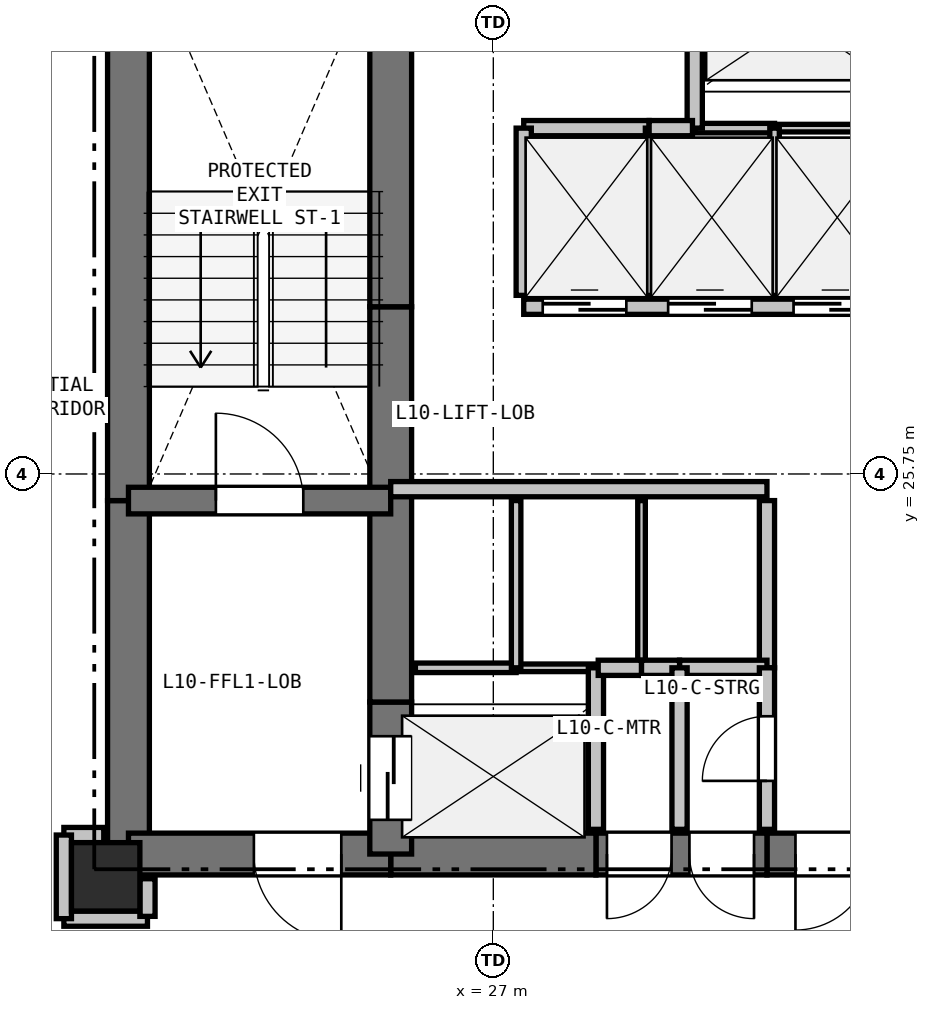
"""IFC4 building model, lengths in metres.
Left out: names, types, materials, properties, quantities, classifications, styles, units other than length and angle.
Written with IfcOpenShell. Run it as: python <this file> out.ifc"""

import sys

from ifc_helpers import new_model, si_unit, direction, frame, frame_2d, origin, origin_2d, place, context, subcontext, project, spatial, rectangle, extrude, element, fill, save


model = new_model("IFC4")
c1 = context("Model", 3, precision=1e-05, world=origin(), true_north=direction((0.0, 1.0)))
c2 = subcontext(c1, "Body", "Model", "MODEL_VIEW")
j1 = project(units=[si_unit("LENGTHUNIT", "METRE"), si_unit("PLANEANGLEUNIT", "RADIAN")], contexts=[c1])
p1 = place(None, origin())
s1 = spatial("IfcSite", under=j1, at=p1, CompositionType="ELEMENT")
p2 = place(p1, origin())
s2 = spatial("IfcBuilding", under=s1, at=p2, CompositionType="ELEMENT")
p3 = place(p2, frame((0.0, 0.0, 39.0)))
s3 = spatial("IfcBuildingStorey", under=s2, at=p3, CompositionType="ELEMENT", Elevation=39.0)
p4 = place(p3, frame((21.9, 20.45, 0.0), z_axis=(0.0, 0.0, 1.0), x_axis=(1.0, 0.0, 0.0)))
e1 = element("IfcColumn", 1, at=p4, inside=s3, PredefinedType="COLUMN", context=c2, shape_type="SweptSolid", body=[
    extrude(rectangle(XDim=0.9, YDim=0.9, at=origin_2d()), origin(), (0.0, 0.0, 1.0), 3.3),
])
p5 = place(p3, frame((22.2, 20.75, 0.0), z_axis=(0.0, 0.0, 1.0), x_axis=(0.0, 1.0, 0.0)))
e2 = element("IfcWall", 2, at=p5, inside=s3, PredefinedType="SHEAR", context=c2, shape_type="SweptSolid", body=[
    extrude(rectangle(XDim=4.65, YDim=0.55, at=frame_2d((2.325, 0.0))), origin(), (0.0, 0.0, 1.0), 3.04),
])
p6 = place(p3, frame((22.2, 25.4, 0.0), z_axis=(0.0, 0.0, 1.0), x_axis=(0.0, 1.0, 0.0)))
e3 = element("IfcWall", 3, at=p6, inside=s3, PredefinedType="SHEAR", context=c2, shape_type="SweptSolid", body=[
    extrude(rectangle(XDim=7.35, YDim=0.55, at=frame_2d((3.675, 0.0))), origin(), (0.0, 0.0, 1.0), 3.04),
])
p7 = place(p3, frame((32.35, 20.75, 0.0), z_axis=(0.0, 0.0, 1.0), x_axis=(-1.0, 0.0, 0.0)))
e4 = element("IfcWall", 4, at=p7, inside=s3, PredefinedType="SHEAR", context=c2, shape_type="SweptSolid", body=[
    extrude(rectangle(XDim=1.75, YDim=0.55, at=frame_2d((0.875, 0.0))), origin(), (0.0, 0.0, 1.0), 3.04),
])
p8 = place(p7, frame((0.375, 0.0, 0.0)))
e5 = element("IfcOpeningElement", 5, at=p8, cuts=e4, PredefinedType="OPENING", context=c2, shape_type="SweptSolid", body=[
    extrude(rectangle(XDim=1.0, YDim=2.15, at=frame_2d((0.5, 1.075))), frame((0.0, 0.285, 0.0), z_axis=(0.0, -1.0, 0.0), x_axis=(1.0, 0.0, 0.0)), (0.0, 0.0, 1.0), 0.57),
])
p9 = place(p3, frame((30.6, 20.75, 0.0), z_axis=(0.0, 0.0, 1.0), x_axis=(-1.0, 0.0, 0.0)))
e6 = element("IfcWall", 6, at=p9, inside=s3, PredefinedType="SHEAR", context=c2, shape_type="SweptSolid", body=[
    extrude(rectangle(XDim=2.25, YDim=0.55, at=frame_2d((1.125, 0.0))), origin(), (0.0, 0.0, 1.0), 3.04),
])
p10 = place(p9, frame((1.255, 0.0, 0.0)))
e7 = element("IfcOpeningElement", 7, at=p10, cuts=e6, PredefinedType="OPENING", context=c2, shape_type="SweptSolid", body=[
    extrude(rectangle(XDim=0.85, YDim=2.1, at=frame_2d((0.425, 1.05))), frame((0.0, 0.285, 0.0), z_axis=(0.0, -1.0, 0.0), x_axis=(1.0, 0.0, 0.0)), (0.0, 0.0, 1.0), 0.57),
])
p11 = place(p9, frame((0.17, 0.0, 0.0)))
e8 = element("IfcOpeningElement", 8, at=p11, cuts=e6, PredefinedType="OPENING", context=c2, shape_type="SweptSolid", body=[
    extrude(rectangle(XDim=0.85, YDim=2.1, at=frame_2d((0.425, 1.05))), frame((0.0, 0.285, 0.0), z_axis=(0.0, -1.0, 0.0), x_axis=(1.0, 0.0, 0.0)), (0.0, 0.0, 1.0), 0.57),
])
p12 = place(p3, frame((28.35, 20.75, 0.0), z_axis=(0.0, 0.0, 1.0), x_axis=(-1.0, 0.0, 0.0)))
e9 = element("IfcWall", 9, at=p12, inside=s3, PredefinedType="SHEAR", context=c2, shape_type="SweptSolid", body=[
    extrude(rectangle(XDim=2.7, YDim=0.55, at=frame_2d((1.35, 0.0))), origin(), (0.0, 0.0, 1.0), 3.04),
])
p13 = place(p3, frame((25.65, 20.75, 0.0), z_axis=(0.0, 0.0, 1.0), x_axis=(-1.0, 0.0, 0.0)))
e10 = element("IfcWall", 10, at=p13, inside=s3, PredefinedType="SHEAR", context=c2, shape_type="SweptSolid", body=[
    extrude(rectangle(XDim=3.45, YDim=0.55, at=frame_2d((1.725, 0.0))), origin(), (0.0, 0.0, 1.0), 3.04),
])
p14 = place(p13, frame((0.65, 0.0, 0.0)))
e11 = element("IfcOpeningElement", 11, at=p14, cuts=e10, PredefinedType="OPENING", context=c2, shape_type="SweptSolid", body=[
    extrude(rectangle(XDim=1.15, YDim=2.15, at=frame_2d((0.575, 1.075))), frame((0.0, 0.285, 0.0), z_axis=(0.0, -1.0, 0.0), x_axis=(1.0, 0.0, 0.0)), (0.0, 0.0, 1.0), 0.57),
])
p15 = place(p3, frame((25.65, 20.75, 0.0), z_axis=(0.0, 0.0, 1.0), x_axis=(0.0, 1.0, 0.0)))
e12 = element("IfcWall", 12, at=p15, inside=s3, PredefinedType="SHEAR", context=c2, shape_type="SweptSolid", body=[
    extrude(rectangle(XDim=2.0, YDim=0.55, at=frame_2d((1.0, 0.0))), origin(), (0.0, 0.0, 1.0), 3.04),
])
p16 = place(p15, frame((0.45, 0.0, 0.0)))
e13 = element("IfcOpeningElement", 13, at=p16, cuts=e12, PredefinedType="OPENING", context=c2, shape_type="SweptSolid", body=[
    extrude(rectangle(XDim=1.1, YDim=2.15, at=frame_2d((0.55, 1.075))), frame((0.0, 0.285, 0.0), z_axis=(0.0, -1.0, 0.0), x_axis=(1.0, 0.0, 0.0)), (0.0, 0.0, 1.0), 0.57),
])
p17 = place(p3, frame((25.65, 22.75, 0.0), z_axis=(0.0, 0.0, 1.0), x_axis=(0.0, 1.0, 0.0)))
e14 = element("IfcWall", 14, at=p17, inside=s3, PredefinedType="SHEAR", context=c2, shape_type="SweptSolid", body=[
    extrude(rectangle(XDim=2.8, YDim=0.55, at=frame_2d((1.4, 0.0))), origin(), (0.0, 0.0, 1.0), 3.04),
])
p18 = place(p3, frame((25.65, 25.55, 0.0), z_axis=(0.0, 0.0, 1.0), x_axis=(0.0, 1.0, 0.0)))
e15 = element("IfcWall", 15, at=p18, inside=s3, PredefinedType="SHEAR", context=c2, shape_type="SweptSolid", body=[
    extrude(rectangle(XDim=2.4, YDim=0.55, at=frame_2d((1.2, 0.0))), origin(), (0.0, 0.0, 1.0), 3.04),
])
p19 = place(p3, frame((25.65, 27.95, 0.0), z_axis=(0.0, 0.0, 1.0), x_axis=(0.0, 1.0, 0.0)))
e16 = element("IfcWall", 16, at=p19, inside=s3, PredefinedType="SHEAR", context=c2, shape_type="SweptSolid", body=[
    extrude(rectangle(XDim=4.8, YDim=0.55, at=frame_2d((2.4, 0.0))), origin(), (0.0, 0.0, 1.0), 3.04),
])
p20 = place(p3, frame((22.2, 25.4, 0.0), z_axis=(0.0, 0.0, 1.0), x_axis=(1.0, 0.0, 0.0)))
e17 = element("IfcWall", 17, at=p20, inside=s3, PredefinedType="SHEAR", context=c2, shape_type="SweptSolid", body=[
    extrude(rectangle(XDim=3.45, YDim=0.35, at=frame_2d((1.725, 0.0))), origin(), (0.0, 0.0, 1.0), 3.04),
])
p21 = place(p20, frame((1.15, 0.0, 0.0)))
e18 = element("IfcOpeningElement", 18, at=p21, cuts=e17, PredefinedType="OPENING", context=c2, shape_type="SweptSolid", body=[
    extrude(rectangle(XDim=1.15, YDim=2.15, at=frame_2d((0.575, 1.075))), frame((0.0, 0.185, 0.0), z_axis=(0.0, -1.0, 0.0), x_axis=(1.0, 0.0, 0.0)), (0.0, 0.0, 1.0), 0.37),
])
p22 = place(p3, frame((25.65, 25.55, 0.0), z_axis=(0.0, 0.0, 1.0), x_axis=(1.0, 0.0, 0.0)))
e19 = element("IfcWall", 19, at=p22, inside=s3, PredefinedType="PARTITIONING", context=c2, shape_type="SweptSolid", body=[
    extrude(rectangle(XDim=4.95, YDim=0.2, at=frame_2d((2.475, 0.0))), origin(), (0.0, 0.0, 1.0), 3.04),
])
p23 = place(p3, frame((27.4, 27.95, 0.0), z_axis=(0.0, 0.0, 1.0), x_axis=(1.0, 0.0, 0.0)))
e20 = element("IfcWall", 20, at=p23, inside=s3, PredefinedType="PARTITIONING", context=c2, shape_type="SweptSolid", body=[
    extrude(rectangle(XDim=4.95, YDim=0.2, at=frame_2d((2.475, 0.0))), origin(), (0.0, 0.0, 1.0), 3.04),
])
p24 = place(p23, frame((0.25, 0.0, 0.0)))
e21 = element("IfcOpeningElement", 21, at=p24, cuts=e20, PredefinedType="OPENING", context=c2, shape_type="SweptSolid", body=[
    extrude(rectangle(XDim=1.1, YDim=2.15, at=frame_2d((0.55, 1.075))), frame((0.0, 0.11, 0.0), z_axis=(0.0, -1.0, 0.0), x_axis=(1.0, 0.0, 0.0)), (0.0, 0.0, 1.0), 0.22),
])
p25 = place(p23, frame((1.9, 0.0, 0.0)))
e22 = element("IfcOpeningElement", 22, at=p25, cuts=e20, PredefinedType="OPENING", context=c2, shape_type="SweptSolid", body=[
    extrude(rectangle(XDim=1.1, YDim=2.15, at=frame_2d((0.55, 1.075))), frame((0.0, 0.11, 0.0), z_axis=(0.0, -1.0, 0.0), x_axis=(1.0, 0.0, 0.0)), (0.0, 0.0, 1.0), 0.22),
])
p26 = place(p23, frame((3.55, 0.0, 0.0)))
e23 = element("IfcOpeningElement", 23, at=p26, cuts=e20, PredefinedType="OPENING", context=c2, shape_type="SweptSolid", body=[
    extrude(rectangle(XDim=1.1, YDim=2.15, at=frame_2d((0.55, 1.075))), frame((0.0, 0.11, 0.0), z_axis=(0.0, -1.0, 0.0), x_axis=(1.0, 0.0, 0.0)), (0.0, 0.0, 1.0), 0.22),
])
p27 = place(p3, frame((25.975, 23.2, 0.0), z_axis=(0.0, 0.0, 1.0), x_axis=(1.0, 0.0, 0.0)))
e24 = element("IfcWall", 24, at=p27, inside=s3, PredefinedType="PARTITIONING", context=c2, shape_type="SweptSolid", body=[
    extrude(rectangle(XDim=1.325, YDim=0.125, at=frame_2d((0.663, 0.0))), origin(), (0.0, 0.0, 1.0), 3.04),
])
p28 = place(p3, frame((27.3, 23.2, 0.0), z_axis=(0.0, 0.0, 1.0), x_axis=(1.0, 0.0, 0.0)))
e25 = element("IfcWall", 25, at=p28, inside=s3, PredefinedType="PARTITIONING", context=c2, shape_type="SweptSolid", body=[
    extrude(rectangle(XDim=1.05, YDim=0.1, at=frame_2d((0.525, 0.0))), origin(), (0.0, 0.0, 1.0), 3.04),
])
p29 = place(p3, frame((28.35, 23.2, 0.0), z_axis=(0.0, 0.0, 1.0), x_axis=(0.0, -1.0, 0.0)))
e26 = element("IfcWall", 26, at=p29, inside=s3, PredefinedType="PARTITIONING", context=c2, shape_type="SweptSolid", body=[
    extrude(rectangle(XDim=2.125, YDim=0.2, at=frame_2d((1.062, 0.0))), origin(), (0.0, 0.0, 1.0), 3.04),
])
p30 = place(p3, frame((32.025, 30.3, 0.0), z_axis=(0.0, 0.0, 1.0), x_axis=(-1.0, 0.0, 0.0)))
e27 = element("IfcWall", 27, at=p30, inside=s3, PredefinedType="PARTITIONING", context=c2, shape_type="SweptSolid", body=[
    extrude(rectangle(XDim=1.325, YDim=0.1, at=frame_2d((0.663, 0.0))), origin(), (0.0, 0.0, 1.0), 3.04),
])
p31 = place(p3, frame((30.7, 30.3, 0.0), z_axis=(0.0, 0.0, 1.0), x_axis=(-1.0, 0.0, 0.0)))
e28 = element("IfcWall", 28, at=p31, inside=s3, PredefinedType="PARTITIONING", context=c2, shape_type="SweptSolid", body=[
    extrude(rectangle(XDim=1.05, YDim=0.125, at=frame_2d((0.525, 0.0))), origin(), (0.0, 0.0, 1.0), 3.04),
])
p32 = place(p3, frame((29.65, 30.3, 0.0), z_axis=(0.0, 0.0, 1.0), x_axis=(0.0, 1.0, 0.0)))
e29 = element("IfcWall", 29, at=p32, inside=s3, PredefinedType="PARTITIONING", context=c2, shape_type="SweptSolid", body=[
    extrude(rectangle(XDim=2.125, YDim=0.2, at=frame_2d((1.062, 0.0))), origin(), (0.0, 0.0, 1.0), 3.04),
])
p33 = place(p3, frame((27.3, 25.4, 0.0), z_axis=(0.0, 0.0, 1.0), x_axis=(0.0, -1.0, 0.0)))
e30 = element("IfcWall", 30, at=p33, inside=s3, PredefinedType="PARTITIONING", context=c2, shape_type="SweptSolid", body=[
    extrude(rectangle(XDim=2.2, YDim=0.125, at=frame_2d((1.1, 0.0))), origin(), (0.0, 0.0, 1.0), 3.04),
])
p34 = place(p3, frame((28.95, 25.4, 0.0), z_axis=(0.0, 0.0, 1.0), x_axis=(0.0, -1.0, 0.0)))
e31 = element("IfcWall", 31, at=p34, inside=s3, PredefinedType="PARTITIONING", context=c2, shape_type="SweptSolid", body=[
    extrude(rectangle(XDim=2.2, YDim=0.1, at=frame_2d((1.1, 0.0))), origin(), (0.0, 0.0, 1.0), 3.04),
])
p35 = place(p3, frame((28.95, 23.2, 0.0), z_axis=(0.0, 0.0, 1.0), x_axis=(-1.0, 0.0, 0.0)))
e32 = element("IfcWall", 32, at=p35, inside=s3, PredefinedType="PARTITIONING", context=c2, shape_type="SweptSolid", body=[
    extrude(rectangle(XDim=0.57, YDim=0.2, at=frame_2d((0.285, 0.0))), origin(), (0.0, 0.0, 1.0), 3.04),
])
p36 = place(p3, frame((30.6, 25.4, 0.0), z_axis=(0.0, 0.0, 1.0), x_axis=(0.0, -1.0, 0.0)))
e33 = element("IfcWall", 33, at=p36, inside=s3, PredefinedType="PARTITIONING", context=c2, shape_type="SweptSolid", body=[
    extrude(rectangle(XDim=2.2, YDim=0.2, at=frame_2d((1.1, 0.0))), origin(), (0.0, 0.0, 1.0), 3.04),
])
p37 = place(p3, frame((30.6, 23.2, 0.0), z_axis=(0.0, 0.0, 1.0), x_axis=(-1.0, 0.0, 0.0)))
e34 = element("IfcWall", 34, at=p37, inside=s3, PredefinedType="PARTITIONING", context=c2, shape_type="SweptSolid", body=[
    extrude(rectangle(XDim=1.15, YDim=0.2, at=frame_2d((0.575, 0.0))), origin(), (0.0, 0.0, 1.0), 3.04),
])
p38 = place(p3, frame((29.45, 23.2, 0.0), z_axis=(0.0, 0.0, 1.0), x_axis=(-1.0, 0.0, 0.0)))
e35 = element("IfcWall", 35, at=p38, inside=s3, PredefinedType="PARTITIONING", context=c2, shape_type="SweptSolid", body=[
    extrude(rectangle(XDim=0.5, YDim=0.2, at=frame_2d((0.25, 0.0))), origin(), (0.0, 0.0, 1.0), 3.04),
])
p39 = place(p3, frame((27.4, 30.3, 0.0), z_axis=(0.0, 0.0, 1.0), x_axis=(1.0, 0.0, 0.0)))
e36 = element("IfcWall", 36, at=p39, inside=s3, PredefinedType="PARTITIONING", context=c2, shape_type="SweptSolid", body=[
    extrude(rectangle(XDim=1.65, YDim=0.2, at=frame_2d((0.825, 0.0))), origin(), (0.0, 0.0, 1.0), 3.04),
])
p40 = place(p3, frame((29.05, 30.3, 0.0), z_axis=(0.0, 0.0, 1.0), x_axis=(0.0, -1.0, 0.0)))
e37 = element("IfcWall", 37, at=p40, inside=s3, PredefinedType="PARTITIONING", context=c2, shape_type="SweptSolid", body=[
    extrude(rectangle(XDim=2.2, YDim=0.1, at=frame_2d((1.1, 0.0))), origin(), (0.0, 0.0, 1.0), 3.04),
])
p41 = place(p3, frame((27.4, 28.1, 0.0), z_axis=(0.0, 0.0, 1.0), x_axis=(0.0, 1.0, 0.0)))
e38 = element("IfcWall", 38, at=p41, inside=s3, PredefinedType="PARTITIONING", context=c2, shape_type="SweptSolid", body=[
    extrude(rectangle(XDim=2.2, YDim=0.2, at=frame_2d((1.1, 0.0))), origin(), (0.0, 0.0, 1.0), 3.04),
])
p42 = place(p3, frame((29.05, 30.3, 0.0), z_axis=(0.0, 0.0, 1.0), x_axis=(1.0, 0.0, 0.0)))
e39 = element("IfcWall", 39, at=p42, inside=s3, PredefinedType="PARTITIONING", context=c2, shape_type="SweptSolid", body=[
    extrude(rectangle(XDim=0.57, YDim=0.2, at=frame_2d((0.285, 0.0))), origin(), (0.0, 0.0, 1.0), 3.04),
])
p43 = place(p3, frame((30.7, 30.3, 0.0), z_axis=(0.0, 0.0, 1.0), x_axis=(0.0, -1.0, 0.0)))
e40 = element("IfcWall", 40, at=p43, inside=s3, PredefinedType="PARTITIONING", context=c2, shape_type="SweptSolid", body=[
    extrude(rectangle(XDim=2.2, YDim=0.125, at=frame_2d((1.1, 0.0))), origin(), (0.0, 0.0, 1.0), 3.04),
])
p44 = place(p3, frame((30.6, 21.075, 0.0), z_axis=(0.0, 0.0, 1.0), x_axis=(0.0, 1.0, 0.0)))
e41 = element("IfcWall", 41, at=p44, inside=s3, PredefinedType="PARTITIONING", context=c2, shape_type="SweptSolid", body=[
    extrude(rectangle(XDim=2.125, YDim=0.2, at=frame_2d((1.062, 0.0))), origin(), (0.0, 0.0, 1.0), 3.04),
])
p45 = place(p44, frame((0.637, 0.0, 0.0)))
e42 = element("IfcOpeningElement", 42, at=p45, cuts=e41, PredefinedType="OPENING", context=c2, shape_type="SweptSolid", body=[
    extrude(rectangle(XDim=0.85, YDim=2.1, at=frame_2d((0.425, 1.05))), frame((0.0, 0.11, 0.0), z_axis=(0.0, -1.0, 0.0), x_axis=(1.0, 0.0, 0.0)), (0.0, 0.0, 1.0), 0.22),
])
p46 = place(p3, frame((21.35, 19.9, 0.0), z_axis=(0.0, 0.0, 1.0), x_axis=(1.0, 0.0, 0.0)))
e43 = element("IfcWall", 43, at=p46, inside=s3, PredefinedType="PARTITIONING", context=c2, shape_type="SweptSolid", body=[
    extrude(rectangle(XDim=1.1, YDim=0.2, at=frame_2d((0.55, 0.0))), origin(), (0.0, 0.0, 1.0), 2.337),
])
p47 = place(p3, frame((22.45, 19.93, 0.0), z_axis=(0.0, 0.0, 1.0), x_axis=(0.0, 1.0, 0.0)))
e44 = element("IfcWall", 44, at=p47, inside=s3, PredefinedType="PARTITIONING", context=c2, shape_type="SweptSolid", body=[
    extrude(rectangle(XDim=0.495, YDim=0.2, at=frame_2d((0.248, 0.0))), origin(), (0.0, 0.0, 1.0), 2.337),
])
p48 = place(p3, frame((21.875, 21.0, 0.0), z_axis=(0.0, 0.0, 1.0), x_axis=(-1.0, 0.0, 0.0)))
e45 = element("IfcWall", 45, at=p48, inside=s3, PredefinedType="PARTITIONING", context=c2, shape_type="SweptSolid", body=[
    extrude(rectangle(XDim=0.525, YDim=0.2, at=frame_2d((0.262, 0.0))), origin(), (0.0, 0.0, 1.0), 2.488),
])
p49 = place(p3, frame((21.35, 21.0, 0.0), z_axis=(0.0, 0.0, 1.0), x_axis=(0.0, -1.0, 0.0)))
e46 = element("IfcWall", 46, at=p49, inside=s3, PredefinedType="PARTITIONING", context=c2, shape_type="SweptSolid", body=[
    extrude(rectangle(XDim=1.1, YDim=0.2, at=frame_2d((0.55, 0.0))), origin(), (0.0, 0.0, 1.0), 2.337),
])
p50 = place(p3, frame((29.45, 23.2, 0.0), z_axis=(0.0, 0.0, 1.0), x_axis=(0.0, -1.0, 0.0)))
e47 = element("IfcWall", 47, at=p50, inside=s3, PredefinedType="PARTITIONING", context=c2, shape_type="SweptSolid", body=[
    extrude(rectangle(XDim=2.125, YDim=0.2, at=frame_2d((1.062, 0.0))), origin(), (0.0, 0.0, 1.0), 3.04),
])
p51 = place(p24, origin())
e48 = element("IfcDoor", 48, at=p51, inside=s3, OperationType="SLIDING_TO_LEFT", PredefinedType="DOOR", context=c2, shape_type="SweptSolid", body=[
    extrude(rectangle(XDim=1.1, YDim=2.15, at=frame_2d((0.55, 1.075))), frame((0.0, 0.025, 0.0), z_axis=(0.0, -1.0, 0.0), x_axis=(1.0, 0.0, 0.0)), (0.0, 0.0, 1.0), 0.05),
])
fill(e21, e48)
p52 = place(p25, origin())
e49 = element("IfcDoor", 49, at=p52, inside=s3, OperationType="SLIDING_TO_LEFT", PredefinedType="DOOR", context=c2, shape_type="SweptSolid", body=[
    extrude(rectangle(XDim=1.1, YDim=2.15, at=frame_2d((0.55, 1.075))), frame((0.0, 0.025, 0.0), z_axis=(0.0, -1.0, 0.0), x_axis=(1.0, 0.0, 0.0)), (0.0, 0.0, 1.0), 0.05),
])
fill(e22, e49)
p53 = place(p26, origin())
e50 = element("IfcDoor", 50, at=p53, inside=s3, OperationType="SLIDING_TO_LEFT", PredefinedType="DOOR", context=c2, shape_type="SweptSolid", body=[
    extrude(rectangle(XDim=1.1, YDim=2.15, at=frame_2d((0.55, 1.075))), frame((0.0, 0.025, 0.0), z_axis=(0.0, -1.0, 0.0), x_axis=(1.0, 0.0, 0.0)), (0.0, 0.0, 1.0), 0.05),
])
fill(e23, e50)
p54 = place(p8, origin())
e51 = element("IfcDoor", 51, at=p54, inside=s3, OperationType="SINGLE_SWING_RIGHT", PredefinedType="DOOR", context=c2, shape_type="SweptSolid", body=[
    extrude(rectangle(XDim=1.0, YDim=2.15, at=frame_2d((0.5, 1.075))), frame((0.0, 0.025, 0.0), z_axis=(0.0, -1.0, 0.0), x_axis=(1.0, 0.0, 0.0)), (0.0, 0.0, 1.0), 0.05),
])
fill(e5, e51)
p55 = place(p16, origin())
e52 = element("IfcDoor", 52, at=p55, inside=s3, OperationType="SLIDING_TO_LEFT", PredefinedType="DOOR", context=c2, shape_type="SweptSolid", body=[
    extrude(rectangle(XDim=1.1, YDim=2.15, at=frame_2d((0.55, 1.075))), frame((0.0, 0.025, 0.0), z_axis=(0.0, -1.0, 0.0), x_axis=(1.0, 0.0, 0.0)), (0.0, 0.0, 1.0), 0.05),
])
fill(e13, e52)
p56 = place(p21, origin())
e53 = element("IfcDoor", 53, at=p56, inside=s3, OperationType="SINGLE_SWING_LEFT", PredefinedType="DOOR", context=c2, shape_type="SweptSolid", body=[
    extrude(rectangle(XDim=1.15, YDim=2.15, at=frame_2d((0.575, 1.075))), frame((0.0, 0.025, 0.0), z_axis=(0.0, -1.0, 0.0), x_axis=(1.0, 0.0, 0.0)), (0.0, 0.0, 1.0), 0.05),
])
fill(e18, e53)
p57 = place(p14, origin())
e54 = element("IfcDoor", 54, at=p57, inside=s3, OperationType="SINGLE_SWING_LEFT", PredefinedType="DOOR", context=c2, shape_type="SweptSolid", body=[
    extrude(rectangle(XDim=1.15, YDim=2.15, at=frame_2d((0.575, 1.075))), frame((0.0, 0.025, 0.0), z_axis=(0.0, -1.0, 0.0), x_axis=(1.0, 0.0, 0.0)), (0.0, 0.0, 1.0), 0.05),
])
fill(e11, e54)
p58 = place(p45, origin())
e55 = element("IfcDoor", 55, at=p58, inside=s3, OperationType="SINGLE_SWING_LEFT", PredefinedType="DOOR", context=c2, shape_type="SweptSolid", body=[
    extrude(rectangle(XDim=0.85, YDim=2.1, at=frame_2d((0.425, 1.05))), frame((0.0, 0.025, 0.0), z_axis=(0.0, -1.0, 0.0), x_axis=(1.0, 0.0, 0.0)), (0.0, 0.0, 1.0), 0.05),
])
fill(e42, e55)
p59 = place(p10, origin())
e56 = element("IfcDoor", 56, at=p59, inside=s3, OperationType="SINGLE_SWING_RIGHT", PredefinedType="DOOR", context=c2, shape_type="SweptSolid", body=[
    extrude(rectangle(XDim=0.85, YDim=2.1, at=frame_2d((0.425, 1.05))), frame((0.0, 0.025, 0.0), z_axis=(0.0, -1.0, 0.0), x_axis=(1.0, 0.0, 0.0)), (0.0, 0.0, 1.0), 0.05),
])
fill(e7, e56)
p60 = place(p11, origin())
e57 = element("IfcDoor", 57, at=p60, inside=s3, OperationType="SINGLE_SWING_LEFT", PredefinedType="DOOR", context=c2, shape_type="SweptSolid", body=[
    extrude(rectangle(XDim=0.85, YDim=2.1, at=frame_2d((0.425, 1.05))), frame((0.0, 0.025, 0.0), z_axis=(0.0, -1.0, 0.0), x_axis=(1.0, 0.0, 0.0)), (0.0, 0.0, 1.0), 0.05),
])
fill(e8, e57)
save(model, sys.argv[1])
